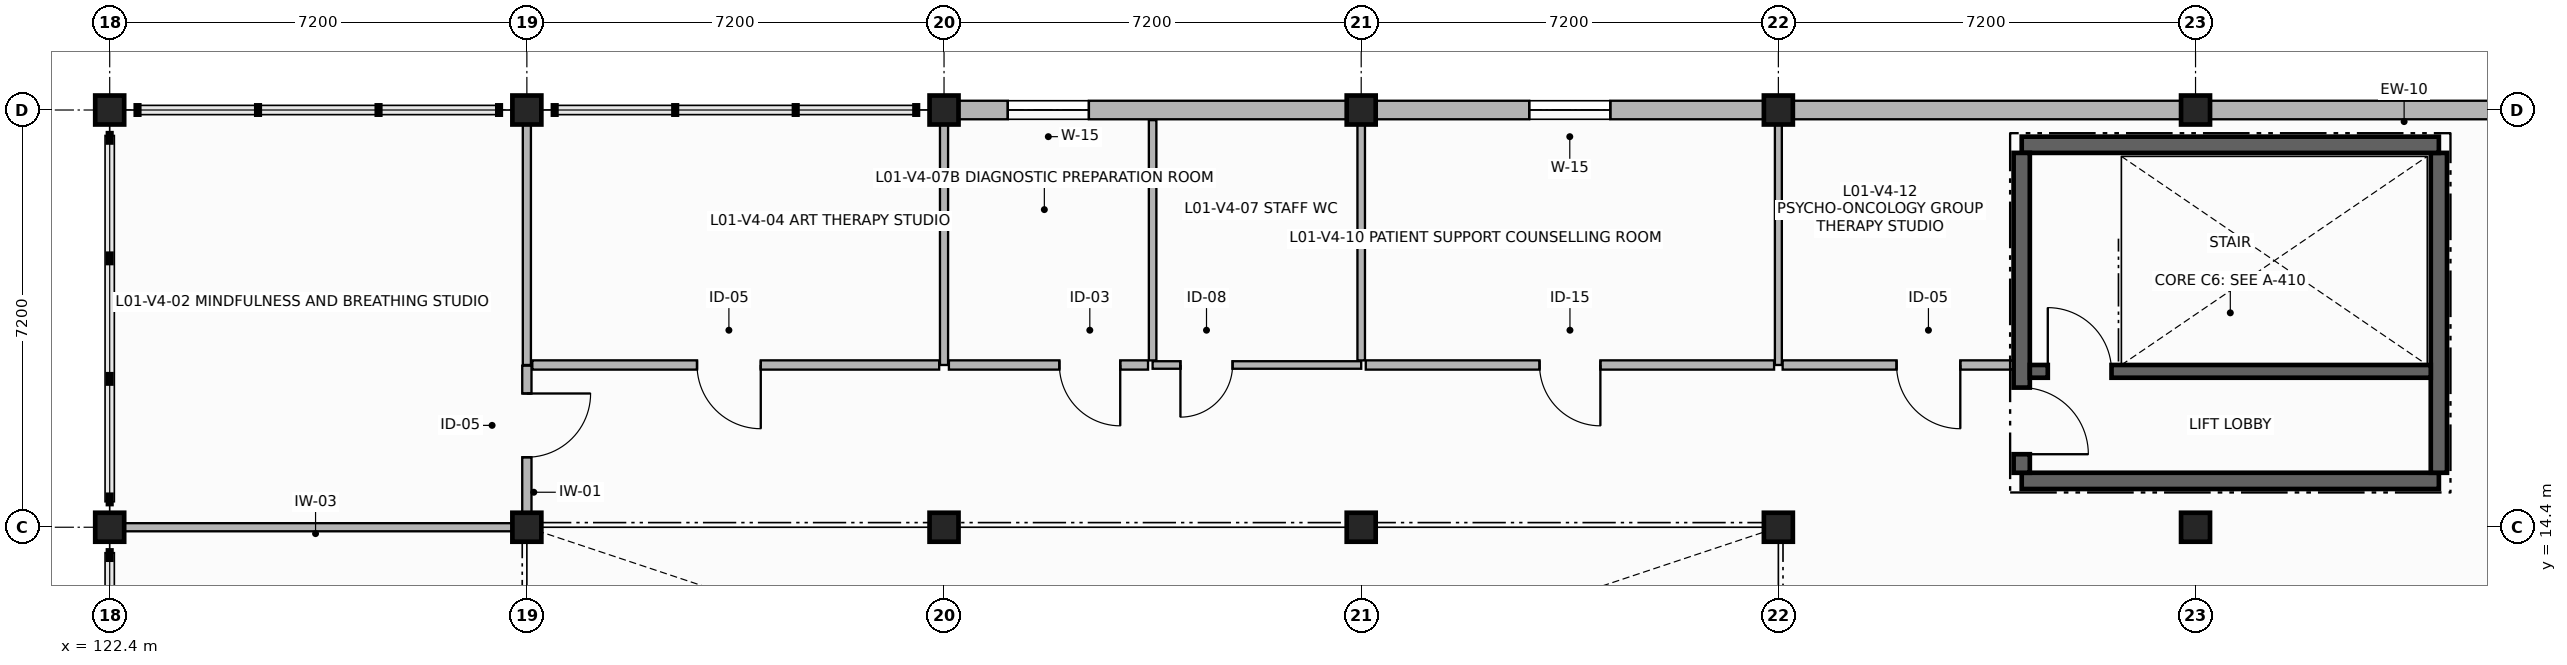
"""IFC4 building model, lengths in metres.
Left out: names, types, materials, properties, quantities, classifications, styles, units other than length and angle.
Written with IfcOpenShell. Run it as: python <this file> out.ifc"""

import sys

from ifc_helpers import new_model, si_unit, direction, frame, frame_2d, origin, origin_2d, place, context, subcontext, project, spatial, rectangle, extrude, element, fill, save


model = new_model("IFC4")
c1 = context("Model", 3, precision=1e-05, world=origin(), true_north=direction((0.0, 1.0)))
c2 = subcontext(c1, "Body", "Model", "MODEL_VIEW")
j1 = project(units=[si_unit("LENGTHUNIT", "METRE"), si_unit("PLANEANGLEUNIT", "RADIAN")], contexts=[c1])
p1 = place(None, origin())
s1 = spatial("IfcSite", under=j1, at=p1, CompositionType="ELEMENT")
p2 = place(p1, origin())
s2 = spatial("IfcBuilding", under=s1, at=p2, CompositionType="ELEMENT")
p3 = place(p2, frame((0.0, 0.0, 4.5)))
s3 = spatial("IfcBuildingStorey", under=s2, at=p3, CompositionType="ELEMENT", Elevation=4.5)
for number, where, z_axis, x_axis in (
    (1, (122.4, 14.4, 0.0), (0.0, 0.0, 1.0), (1.0, 0.0, 0.0)),
    (2, (122.4, 21.6, 0.0), (0.0, 0.0, 1.0), (1.0, 0.0, 0.0)),
    (3, (129.6, 14.4, 0.0), (0.0, 0.0, 1.0), (1.0, 0.0, 0.0)),
    (4, (129.6, 21.6, 0.0), (0.0, 0.0, 1.0), (1.0, 0.0, 0.0)),
    (5, (136.8, 14.4, 0.0), (0.0, 0.0, 1.0), (1.0, 0.0, 0.0)),
    (6, (136.8, 21.6, 0.0), (0.0, 0.0, 1.0), (1.0, 0.0, 0.0)),
    (7, (144.0, 14.4, 0.0), (0.0, 0.0, 1.0), (1.0, 0.0, 0.0)),
    (8, (144.0, 21.6, 0.0), (0.0, 0.0, 1.0), (1.0, 0.0, 0.0)),
    (9, (151.2, 14.4, 0.0), (0.0, 0.0, 1.0), (1.0, 0.0, 0.0)),
    (10, (151.2, 21.6, 0.0), (0.0, 0.0, 1.0), (1.0, 0.0, 0.0)),
    (11, (158.4, 14.4, 0.0), (0.0, 0.0, 1.0), (1.0, 0.0, 0.0)),
    (12, (158.4, 21.6, 0.0), (0.0, 0.0, 1.0), (1.0, 0.0, 0.0)),
):
    element("IfcColumn", number, at=place(p3, frame(where, z_axis=z_axis, x_axis=x_axis)), inside=s3, PredefinedType="COLUMN", context=c2, shape_type="SweptSolid", body=[
        extrude(rectangle(XDim=0.5, YDim=0.5, at=origin_2d()), origin(), (0.0, 0.0, 1.0), 3.9),
    ])
p4 = place(p3, frame((165.6, 21.6, 0.0), z_axis=(0.0, 0.0, 1.0), x_axis=(-1.0, 0.0, 0.0)))
e13 = element("IfcWall", 13, at=p4, inside=s3, PredefinedType="SOLIDWALL", context=c2, shape_type="SweptSolid", body=[
    extrude(rectangle(XDim=7.2, YDim=0.32, at=frame_2d((3.6, 0.0))), origin(), (0.0, 0.0, 1.0), 3.3),
])
p5 = place(p3, frame((158.4, 21.6, 0.0), z_axis=(0.0, 0.0, 1.0), x_axis=(-1.0, 0.0, 0.0)))
e14 = element("IfcWall", 14, at=p5, inside=s3, PredefinedType="SOLIDWALL", context=c2, shape_type="SweptSolid", body=[
    extrude(rectangle(XDim=7.2, YDim=0.32, at=frame_2d((3.6, 0.0))), origin(), (0.0, 0.0, 1.0), 3.3),
])
p6 = place(p3, frame((151.2, 21.6, 0.0), z_axis=(0.0, 0.0, 1.0), x_axis=(-1.0, 0.0, 0.0)))
e15 = element("IfcWall", 15, at=p6, inside=s3, PredefinedType="SOLIDWALL", context=c2, shape_type="SweptSolid", body=[
    extrude(rectangle(XDim=7.2, YDim=0.32, at=frame_2d((3.6, 0.0))), origin(), (0.0, 0.0, 1.0), 3.3),
])
p7 = place(p6, frame((2.9, 0.0, 0.85)))
e16 = element("IfcOpeningElement", 16, at=p7, cuts=e15, PredefinedType="OPENING", context=c2, shape_type="SweptSolid", body=[
    extrude(rectangle(XDim=1.4, YDim=2.2, at=frame_2d((0.7, 1.1))), frame((0.0, 0.17, 0.0), z_axis=(0.0, -1.0, 0.0), x_axis=(1.0, 0.0, 0.0)), (0.0, 0.0, 1.0), 0.34),
])
p8 = place(p3, frame((144.0, 21.6, 0.0), z_axis=(0.0, 0.0, 1.0), x_axis=(-1.0, 0.0, 0.0)))
e17 = element("IfcWall", 17, at=p8, inside=s3, PredefinedType="SOLIDWALL", context=c2, shape_type="SweptSolid", body=[
    extrude(rectangle(XDim=7.2, YDim=0.32, at=frame_2d((3.6, 0.0))), origin(), (0.0, 0.0, 1.0), 3.3),
])
p9 = place(p8, frame((4.7, 0.0, 0.85)))
e18 = element("IfcOpeningElement", 18, at=p9, cuts=e17, PredefinedType="OPENING", context=c2, shape_type="SweptSolid", body=[
    extrude(rectangle(XDim=1.4, YDim=2.2, at=frame_2d((0.7, 1.1))), frame((0.0, 0.17, 0.0), z_axis=(0.0, -1.0, 0.0), x_axis=(1.0, 0.0, 0.0)), (0.0, 0.0, 1.0), 0.34),
])
p10 = place(p3, frame((155.4, 15.2, 0.0), z_axis=(0.0, 0.0, 1.0), x_axis=(1.0, 0.0, 0.0)))
e19 = element("IfcWall", 19, at=p10, inside=s3, PredefinedType="SHEAR", context=c2, shape_type="SweptSolid", body=[
    extrude(rectangle(XDim=7.2, YDim=0.28, at=frame_2d((3.6, 0.0))), origin(), (0.0, 0.0, 1.0), 3.71),
])
p11 = place(p3, frame((162.6, 15.34, 0.0), z_axis=(0.0, 0.0, 1.0), x_axis=(0.0, 1.0, 0.0)))
e20 = element("IfcWall", 20, at=p11, inside=s3, PredefinedType="SHEAR", context=c2, shape_type="SweptSolid", body=[
    extrude(rectangle(XDim=5.52, YDim=0.28, at=frame_2d((2.76, 0.0))), origin(), (0.0, 0.0, 1.0), 3.71),
])
p12 = place(p3, frame((162.6, 21.0, 0.0), z_axis=(0.0, 0.0, 1.0), x_axis=(-1.0, 0.0, 0.0)))
e21 = element("IfcWall", 21, at=p12, inside=s3, PredefinedType="SHEAR", context=c2, shape_type="SweptSolid", body=[
    extrude(rectangle(XDim=7.2, YDim=0.28, at=frame_2d((3.6, 0.0))), origin(), (0.0, 0.0, 1.0), 3.71),
])
p13 = place(p3, frame((155.4, 20.86, 0.0), z_axis=(0.0, 0.0, 1.0), x_axis=(0.0, -1.0, 0.0)))
e22 = element("IfcWall", 22, at=p13, inside=s3, PredefinedType="SHEAR", context=c2, shape_type="SweptSolid", body=[
    extrude(rectangle(XDim=5.52, YDim=0.28, at=frame_2d((2.76, 0.0))), origin(), (0.0, 0.0, 1.0), 3.71),
])
p14 = place(p13, frame((4.05, 0.0, 0.0)))
e23 = element("IfcOpeningElement", 23, at=p14, cuts=e22, PredefinedType="OPENING", context=c2, shape_type="SweptSolid", body=[
    extrude(rectangle(XDim=1.15, YDim=2.2, at=frame_2d((0.575, 1.1))), frame((0.0, 0.15, 0.0), z_axis=(0.0, -1.0, 0.0), x_axis=(1.0, 0.0, 0.0)), (0.0, 0.0, 1.0), 0.3),
])
p15 = place(p3, frame((155.54, 17.09, 0.0), z_axis=(0.0, 0.0, 1.0), x_axis=(1.0, 0.0, 0.0)))
e24 = element("IfcWall", 24, at=p15, inside=s3, PredefinedType="SHEAR", context=c2, shape_type="SweptSolid", body=[
    extrude(rectangle(XDim=6.92, YDim=0.22, at=frame_2d((3.46, 0.0))), origin(), (0.0, 0.0, 1.0), 3.71),
])
p16 = place(p15, frame((0.31, 0.0, 0.0)))
e25 = element("IfcOpeningElement", 25, at=p16, cuts=e24, PredefinedType="OPENING", context=c2, shape_type="SweptSolid", body=[
    extrude(rectangle(XDim=1.1, YDim=2.15, at=frame_2d((0.55, 1.075))), frame((0.0, 0.12, 0.0), z_axis=(0.0, -1.0, 0.0), x_axis=(1.0, 0.0, 0.0)), (0.0, 0.0, 1.0), 0.24),
])
p17 = place(p3, frame((129.6, 21.6, 0.0), z_axis=(0.0, 0.0, 1.0), x_axis=(0.0, -1.0, 0.0)))
e26 = element("IfcWall", 26, at=p17, inside=s3, PredefinedType="PARTITIONING", context=c2, shape_type="SweptSolid", body=[
    extrude(rectangle(XDim=4.4, YDim=0.14, at=frame_2d((2.2, 0.0))), origin(), (0.0, 0.0, 1.0), 3.03),
])
p18 = place(p3, frame((129.6, 17.188, 0.0), z_axis=(0.0, 0.0, 1.0), x_axis=(0.0, -1.0, 0.0)))
e27 = element("IfcWall", 27, at=p18, inside=s3, PredefinedType="PARTITIONING", context=c2, shape_type="SweptSolid", body=[
    extrude(rectangle(XDim=2.788, YDim=0.16, at=frame_2d((1.394, 0.0))), origin(), (0.0, 0.0, 1.0), 3.03),
])
p19 = place(p18, frame((0.48, 0.0, 0.0)))
e28 = element("IfcOpeningElement", 28, at=p19, cuts=e27, PredefinedType="OPENING", context=c2, shape_type="SweptSolid", body=[
    extrude(rectangle(XDim=1.1, YDim=2.2, at=frame_2d((0.55, 1.1))), frame((0.0, 0.09, 0.0), z_axis=(0.0, -1.0, 0.0), x_axis=(1.0, 0.0, 0.0)), (0.0, 0.0, 1.0), 0.18),
])
p20 = place(p3, frame((129.506, 14.4, 0.0), z_axis=(0.0, 0.0, 1.0), x_axis=(-1.0, 0.0, 0.0)))
e29 = element("IfcWall", 29, at=p20, inside=s3, PredefinedType="PARTITIONING", context=c2, shape_type="SweptSolid", body=[
    extrude(rectangle(XDim=7.106, YDim=0.14, at=frame_2d((3.553, 0.0))), origin(), (0.0, 0.0, 1.0), 3.03),
])
p21 = place(p3, frame((136.8, 21.425, 0.0), z_axis=(0.0, 0.0, 1.0), x_axis=(0.0, -1.0, 0.0)))
e30 = element("IfcWall", 30, at=p21, inside=s3, PredefinedType="PARTITIONING", context=c2, shape_type="SweptSolid", body=[
    extrude(rectangle(XDim=4.225, YDim=0.14, at=frame_2d((2.113, 0.0))), origin(), (0.0, 0.0, 1.0), 3.03),
])
p22 = place(p3, frame((136.716, 17.2, 0.0), z_axis=(0.0, 0.0, 1.0), x_axis=(-1.0, 0.0, 0.0)))
e31 = element("IfcWall", 31, at=p22, inside=s3, PredefinedType="PARTITIONING", context=c2, shape_type="SweptSolid", body=[
    extrude(rectangle(XDim=7.022, YDim=0.16, at=frame_2d((3.511, 0.0))), origin(), (0.0, 0.0, 1.0), 3.03),
])
p23 = place(p22, frame((3.079, 0.0, 0.0)))
e32 = element("IfcOpeningElement", 32, at=p23, cuts=e31, PredefinedType="OPENING", context=c2, shape_type="SweptSolid", body=[
    extrude(rectangle(XDim=1.1, YDim=2.2, at=frame_2d((0.55, 1.1))), frame((0.0, 0.09, 0.0), z_axis=(0.0, -1.0, 0.0), x_axis=(1.0, 0.0, 0.0)), (0.0, 0.0, 1.0), 0.18),
])
p24 = place(p3, frame((144.0, 17.2, 0.0), z_axis=(0.0, 0.0, 1.0), x_axis=(-1.0, 0.0, 0.0)))
e33 = element("IfcWall", 33, at=p24, inside=s3, PredefinedType="PARTITIONING", context=c2, shape_type="SweptSolid", body=[
    extrude(rectangle(XDim=3.6, YDim=0.13, at=frame_2d((1.8, 0.0))), origin(), (0.0, 0.0, 1.0), 3.03),
])
p25 = place(p24, frame((2.22, 0.0, 0.0)))
e34 = element("IfcOpeningElement", 34, at=p25, cuts=e33, PredefinedType="OPENING", context=c2, shape_type="SweptSolid", body=[
    extrude(rectangle(XDim=0.9, YDim=2.1, at=frame_2d((0.45, 1.05))), frame((0.0, 0.075, 0.0), z_axis=(0.0, -1.0, 0.0), x_axis=(1.0, 0.0, 0.0)), (0.0, 0.0, 1.0), 0.15),
])
for number, where, z_axis, x_axis in (
    (35, (140.4, 17.279, 0.0), (0.0, 0.0, 1.0), (0.0, 1.0, 0.0)),
    (36, (144.0, 21.425, 0.0), (0.0, 0.0, 1.0), (0.0, -1.0, 0.0)),
):
    element("IfcWall", number, at=place(p3, frame(where, z_axis=z_axis, x_axis=x_axis)), inside=s3, PredefinedType="PARTITIONING", context=c2, shape_type="SweptSolid", body=[
        extrude(rectangle(XDim=4.146, YDim=0.13, at=frame_2d((2.073, 0.0))), origin(), (0.0, 0.0, 1.0), 3.03),
    ])
p26 = place(p3, frame((140.321, 17.2, 0.0), z_axis=(0.0, 0.0, 1.0), x_axis=(-1.0, 0.0, 0.0)))
e37 = element("IfcWall", 37, at=p26, inside=s3, PredefinedType="PARTITIONING", context=c2, shape_type="SweptSolid", body=[
    extrude(rectangle(XDim=3.437, YDim=0.16, at=frame_2d((1.719, 0.0))), origin(), (0.0, 0.0, 1.0), 3.03),
])
p27 = place(p26, frame((0.48, 0.0, 0.0)))
e38 = element("IfcOpeningElement", 38, at=p27, cuts=e37, PredefinedType="OPENING", context=c2, shape_type="SweptSolid", body=[
    extrude(rectangle(XDim=1.05, YDim=2.15, at=frame_2d((0.525, 1.075))), frame((0.0, 0.09, 0.0), z_axis=(0.0, -1.0, 0.0), x_axis=(1.0, 0.0, 0.0)), (0.0, 0.0, 1.0), 0.18),
])
p28 = place(p3, frame((151.2, 21.425, 0.0), z_axis=(0.0, 0.0, 1.0), x_axis=(0.0, -1.0, 0.0)))
e39 = element("IfcWall", 39, at=p28, inside=s3, PredefinedType="PARTITIONING", context=c2, shape_type="SweptSolid", body=[
    extrude(rectangle(XDim=4.225, YDim=0.12, at=frame_2d((2.113, 0.0))), origin(), (0.0, 0.0, 1.0), 3.03),
])
p29 = place(p3, frame((151.126, 17.2, 0.0), z_axis=(0.0, 0.0, 1.0), x_axis=(-1.0, 0.0, 0.0)))
e40 = element("IfcWall", 40, at=p29, inside=s3, PredefinedType="PARTITIONING", context=c2, shape_type="SweptSolid", body=[
    extrude(rectangle(XDim=7.047, YDim=0.16, at=frame_2d((3.523, 0.0))), origin(), (0.0, 0.0, 1.0), 3.03),
])
p30 = place(p29, frame((2.998, 0.0, 0.0)))
e41 = element("IfcOpeningElement", 41, at=p30, cuts=e40, PredefinedType="OPENING", context=c2, shape_type="SweptSolid", body=[
    extrude(rectangle(XDim=1.05, YDim=2.2, at=frame_2d((0.525, 1.1))), frame((0.0, 0.09, 0.0), z_axis=(0.0, -1.0, 0.0), x_axis=(1.0, 0.0, 0.0)), (0.0, 0.0, 1.0), 0.18),
])
p31 = place(p3, frame((155.245, 17.2, 0.0), z_axis=(0.0, 0.0, 1.0), x_axis=(-1.0, 0.0, 0.0)))
e42 = element("IfcWall", 42, at=p31, inside=s3, PredefinedType="PARTITIONING", context=c2, shape_type="SweptSolid", body=[
    extrude(rectangle(XDim=3.971, YDim=0.16, at=frame_2d((1.986, 0.0))), origin(), (0.0, 0.0, 1.0), 3.03),
])
p32 = place(p31, frame((0.905, 0.0, 0.0)))
e43 = element("IfcOpeningElement", 43, at=p32, cuts=e42, PredefinedType="OPENING", context=c2, shape_type="SweptSolid", body=[
    extrude(rectangle(XDim=1.1, YDim=2.2, at=frame_2d((0.55, 1.1))), frame((0.0, 0.09, 0.0), z_axis=(0.0, -1.0, 0.0), x_axis=(1.0, 0.0, 0.0)), (0.0, 0.0, 1.0), 0.18),
])
p33 = place(p7, origin())
e44 = element("IfcWindow", 44, at=p33, inside=s3, PartitioningType="SINGLE_PANEL", PredefinedType="WINDOW", context=c2, shape_type="SweptSolid", body=[
    extrude(rectangle(XDim=1.4, YDim=2.2, at=frame_2d((0.7, 1.1))), frame((0.0, 0.03, 0.0), z_axis=(0.0, -1.0, 0.0), x_axis=(1.0, 0.0, 0.0)), (0.0, 0.0, 1.0), 0.06),
])
fill(e16, e44)
p34 = place(p9, origin())
e45 = element("IfcWindow", 45, at=p34, inside=s3, PartitioningType="SINGLE_PANEL", PredefinedType="WINDOW", context=c2, shape_type="SweptSolid", body=[
    extrude(rectangle(XDim=1.4, YDim=2.2, at=frame_2d((0.7, 1.1))), frame((0.0, 0.03, 0.0), z_axis=(0.0, -1.0, 0.0), x_axis=(1.0, 0.0, 0.0)), (0.0, 0.0, 1.0), 0.06),
])
fill(e18, e45)
p35 = place(p16, origin())
e46 = element("IfcDoor", 46, at=p35, inside=s3, OperationType="SINGLE_SWING_LEFT", PredefinedType="DOOR", context=c2, shape_type="SweptSolid", body=[
    extrude(rectangle(XDim=1.1, YDim=2.15, at=frame_2d((0.55, 1.075))), frame((0.0, 0.025, 0.0), z_axis=(0.0, -1.0, 0.0), x_axis=(1.0, 0.0, 0.0)), (0.0, 0.0, 1.0), 0.05),
])
fill(e25, e46)
p36 = place(p14, origin())
e47 = element("IfcDoor", 47, at=p36, inside=s3, OperationType="SINGLE_SWING_RIGHT", PredefinedType="DOOR", context=c2, shape_type="SweptSolid", body=[
    extrude(rectangle(XDim=1.15, YDim=2.2, at=frame_2d((0.575, 1.1))), frame((0.0, 0.025, 0.0), z_axis=(0.0, -1.0, 0.0), x_axis=(1.0, 0.0, 0.0)), (0.0, 0.0, 1.0), 0.05),
])
fill(e23, e47)
p37 = place(p19, origin())
e48 = element("IfcDoor", 48, at=p37, inside=s3, OperationType="SINGLE_SWING_LEFT", PredefinedType="DOOR", context=c2, shape_type="SweptSolid", body=[
    extrude(rectangle(XDim=1.1, YDim=2.2, at=frame_2d((0.55, 1.1))), frame((0.0, 0.025, 0.0), z_axis=(0.0, -1.0, 0.0), x_axis=(1.0, 0.0, 0.0)), (0.0, 0.0, 1.0), 0.05),
])
fill(e28, e48)
p38 = place(p23, origin())
e49 = element("IfcDoor", 49, at=p38, inside=s3, OperationType="SINGLE_SWING_LEFT", PredefinedType="DOOR", context=c2, shape_type="SweptSolid", body=[
    extrude(rectangle(XDim=1.1, YDim=2.2, at=frame_2d((0.55, 1.1))), frame((0.0, 0.025, 0.0), z_axis=(0.0, -1.0, 0.0), x_axis=(1.0, 0.0, 0.0)), (0.0, 0.0, 1.0), 0.05),
])
fill(e32, e49)
p39 = place(p25, origin())
e50 = element("IfcDoor", 50, at=p39, inside=s3, OperationType="SINGLE_SWING_RIGHT", PredefinedType="DOOR", context=c2, shape_type="SweptSolid", body=[
    extrude(rectangle(XDim=0.9, YDim=2.1, at=frame_2d((0.45, 1.05))), frame((0.0, 0.025, 0.0), z_axis=(0.0, -1.0, 0.0), x_axis=(1.0, 0.0, 0.0)), (0.0, 0.0, 1.0), 0.05),
])
fill(e34, e50)
p40 = place(p27, origin())
e51 = element("IfcDoor", 51, at=p40, inside=s3, OperationType="SINGLE_SWING_LEFT", PredefinedType="DOOR", context=c2, shape_type="SweptSolid", body=[
    extrude(rectangle(XDim=1.05, YDim=2.15, at=frame_2d((0.525, 1.075))), frame((0.0, 0.025, 0.0), z_axis=(0.0, -1.0, 0.0), x_axis=(1.0, 0.0, 0.0)), (0.0, 0.0, 1.0), 0.05),
])
fill(e38, e51)
p41 = place(p30, origin())
e52 = element("IfcDoor", 52, at=p41, inside=s3, OperationType="SINGLE_SWING_LEFT", PredefinedType="DOOR", context=c2, shape_type="SweptSolid", body=[
    extrude(rectangle(XDim=1.05, YDim=2.2, at=frame_2d((0.525, 1.1))), frame((0.0, 0.025, 0.0), z_axis=(0.0, -1.0, 0.0), x_axis=(1.0, 0.0, 0.0)), (0.0, 0.0, 1.0), 0.05),
])
fill(e41, e52)
p42 = place(p32, origin())
e53 = element("IfcDoor", 53, at=p42, inside=s3, OperationType="SINGLE_SWING_LEFT", PredefinedType="DOOR", context=c2, shape_type="SweptSolid", body=[
    extrude(rectangle(XDim=1.1, YDim=2.2, at=frame_2d((0.55, 1.1))), frame((0.0, 0.025, 0.0), z_axis=(0.0, -1.0, 0.0), x_axis=(1.0, 0.0, 0.0)), (0.0, 0.0, 1.0), 0.05),
])
fill(e43, e53)
save(model, sys.argv[1])
